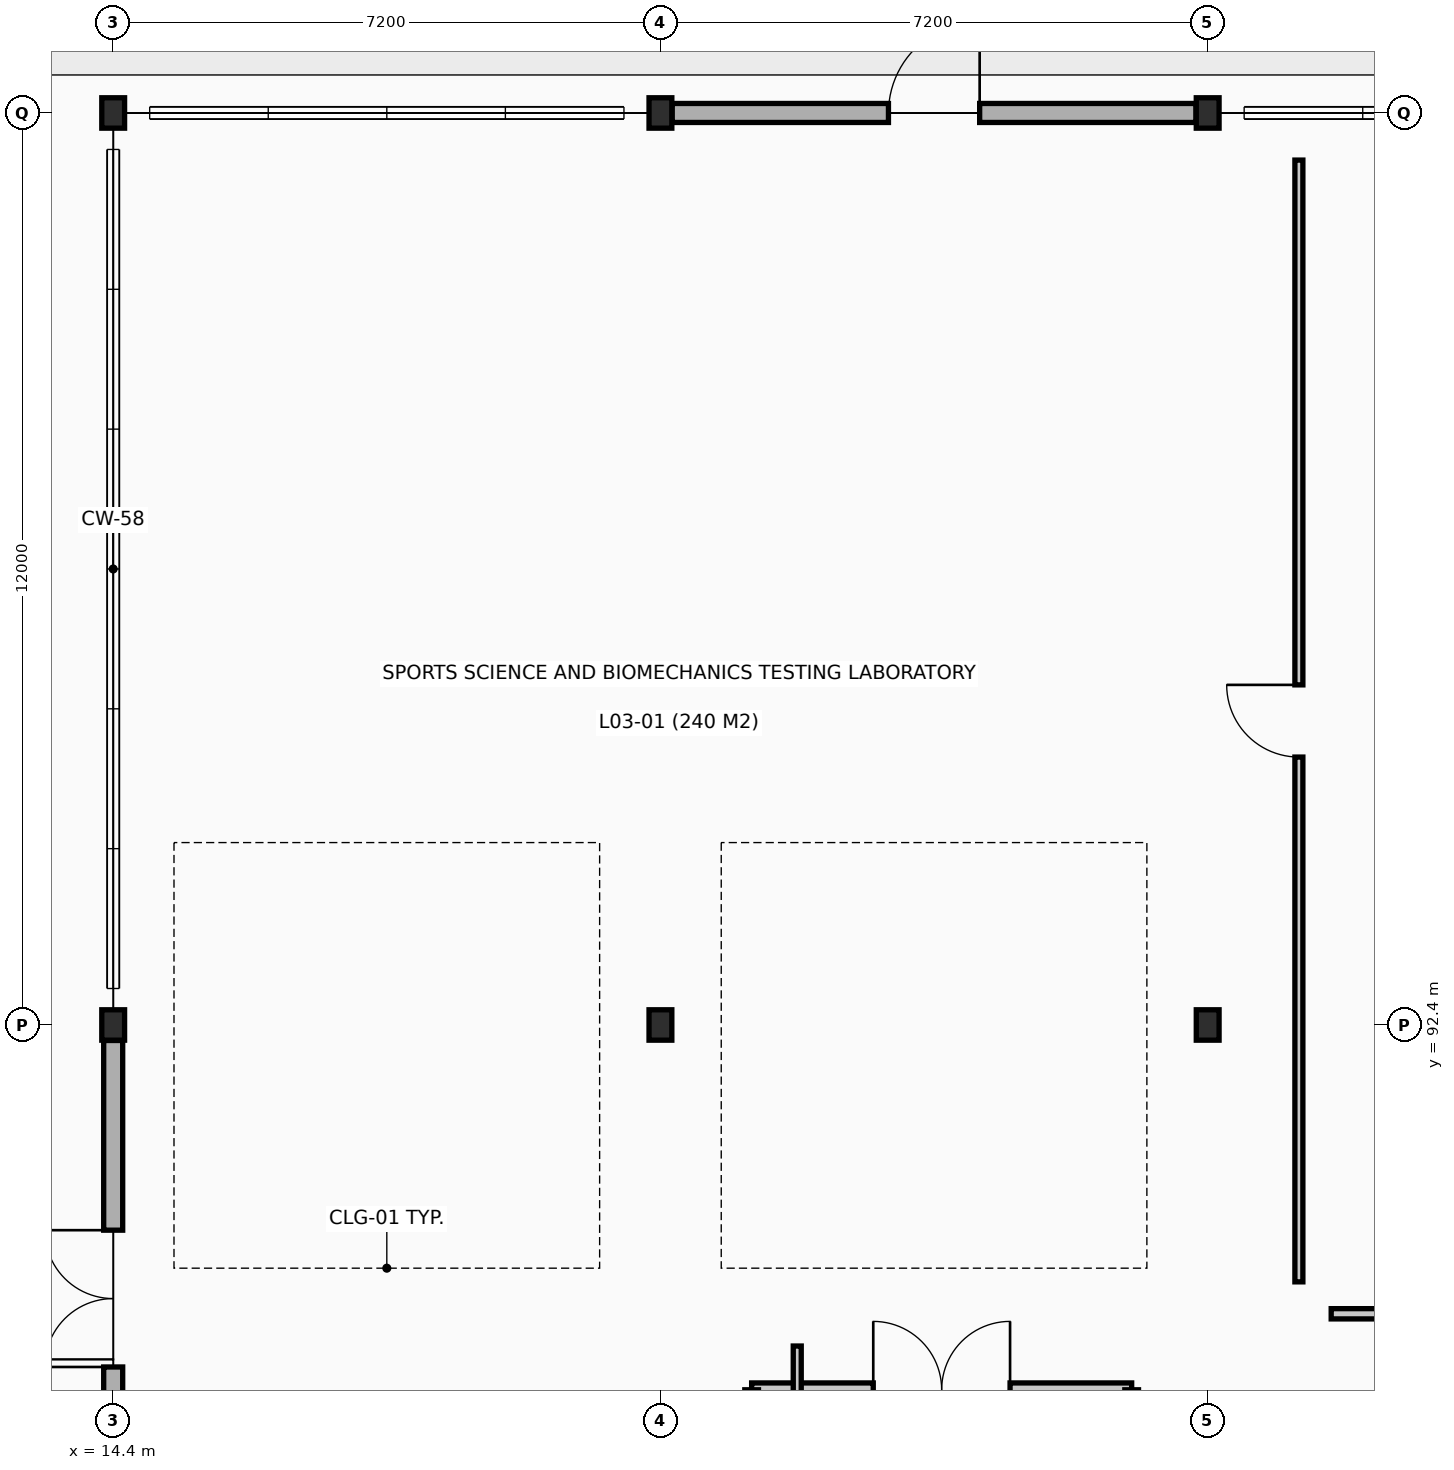
"""IFC4 building model, lengths in metres.
Left out: names, types, materials, properties, quantities, classifications, styles, units other than length and angle.
Written with IfcOpenShell. Run it as: python <this file> out.ifc"""

import sys

from ifc_helpers import new_model, si_unit, direction, frame, frame_2d, origin, origin_2d, place, context, subcontext, project, spatial, rectangle, i_section, extrude, element, fill, save


model = new_model("IFC4")
c1 = context("Model", 3, precision=1e-05, world=origin(), true_north=direction((0.0, 1.0)))
c2 = subcontext(c1, "Body", "Model", "MODEL_VIEW")
j1 = project(units=[si_unit("LENGTHUNIT", "METRE"), si_unit("PLANEANGLEUNIT", "RADIAN")], contexts=[c1])
p1 = place(None, origin())
s1 = spatial("IfcSite", under=j1, at=p1, CompositionType="ELEMENT")
p2 = place(p1, origin())
s2 = spatial("IfcBuilding", under=s1, at=p2, CompositionType="ELEMENT")
p3 = place(p2, frame((0.0, 0.0, 14.4)))
s3 = spatial("IfcBuildingStorey", under=s2, at=p3, CompositionType="ELEMENT", Elevation=14.4)
for number, where, z_axis, x_axis in (
    (1, (14.4, 92.4, 0.0), (0.0, 0.0, 1.0), (1.0, 0.0, 0.0)),
    (2, (14.4, 104.4, 0.0), (0.0, 0.0, 1.0), (1.0, 0.0, 0.0)),
    (3, (21.6, 92.4, 0.0), (0.0, 0.0, 1.0), (1.0, 0.0, 0.0)),
    (4, (21.6, 104.4, 0.0), (0.0, 0.0, 1.0), (1.0, 0.0, 0.0)),
    (5, (28.8, 92.4, 0.0), (0.0, 0.0, 1.0), (1.0, 0.0, 0.0)),
    (6, (28.8, 104.4, 0.0), (0.0, 0.0, 1.0), (1.0, 0.0, 0.0)),
):
    element("IfcColumn", number, at=place(p3, frame(where, z_axis=z_axis, x_axis=x_axis)), inside=s3, PredefinedType="COLUMN", context=c2, shape_type="SweptSolid", body=[
        extrude(i_section(OverallWidth=0.3, OverallDepth=0.4, WebThickness=0.013, FlangeThickness=0.024, at=origin_2d()), origin(), (0.0, 0.0, 1.0), 4.8),
    ])
p4 = place(p3, frame((21.754, 104.4, 0.0), z_axis=(0.0, 0.0, 1.0), x_axis=(1.0, 0.0, 0.0)))
e7 = element("IfcWall", 7, at=p4, inside=s3, PredefinedType="SOLIDWALL", context=c2, shape_type="SweptSolid", body=[
    extrude(rectangle(XDim=6.892, YDim=0.25, at=frame_2d((3.446, 0.0))), origin(), (0.0, 0.0, 1.0), 3.15),
])
p5 = place(p4, frame((2.846, 0.0, 0.0)))
e8 = element("IfcOpeningElement", 8, at=p5, cuts=e7, PredefinedType="OPENING", context=c2, shape_type="SweptSolid", body=[
    extrude(rectangle(XDim=1.2, YDim=2.2, at=frame_2d((0.6, 1.1))), frame((0.0, 0.135, 0.0), z_axis=(0.0, -1.0, 0.0), x_axis=(1.0, 0.0, 0.0)), (0.0, 0.0, 1.0), 0.27),
])
p6 = place(p3, frame((14.4, 85.404, 0.0), z_axis=(0.0, 0.0, 1.0), x_axis=(0.0, 1.0, 0.0)))
e9 = element("IfcWall", 9, at=p6, inside=s3, PredefinedType="SOLIDWALL", context=c2, shape_type="SweptSolid", body=[
    extrude(rectangle(XDim=6.792, YDim=0.25, at=frame_2d((3.396, 0.0))), origin(), (0.0, 0.0, 1.0), 3.15),
])
p7 = place(p6, frame((2.496, 0.0, 0.0)))
e10 = element("IfcOpeningElement", 10, at=p7, cuts=e9, PredefinedType="OPENING", context=c2, shape_type="SweptSolid", body=[
    extrude(rectangle(XDim=1.8, YDim=2.2, at=frame_2d((0.9, 1.1))), frame((0.0, 0.135, 0.0), z_axis=(0.0, -1.0, 0.0), x_axis=(1.0, 0.0, 0.0)), (0.0, 0.0, 1.0), 0.27),
])
p8 = place(p3, frame((22.8, 87.6, 0.0), z_axis=(0.0, 0.0, 1.0), x_axis=(1.0, 0.0, 0.0)))
e11 = element("IfcWall", 11, at=p8, inside=s3, PredefinedType="PARTITIONING", context=c2, shape_type="SweptSolid", body=[
    extrude(rectangle(XDim=5.0, YDim=0.18, at=frame_2d((2.5, 0.0))), origin(), (0.0, 0.0, 1.0), 3.985),
])
p9 = place(p8, frame((1.6, 0.0, 0.0)))
e12 = element("IfcOpeningElement", 12, at=p9, cuts=e11, PredefinedType="OPENING", context=c2, shape_type="SweptSolid", body=[
    extrude(rectangle(XDim=1.8, YDim=2.15, at=frame_2d((0.9, 1.075))), frame((0.0, 0.1, 0.0), z_axis=(0.0, -1.0, 0.0), x_axis=(1.0, 0.0, 0.0)), (0.0, 0.0, 1.0), 0.2),
])
p10 = place(p3, frame((30.0, 89.02, 0.0), z_axis=(0.0, 0.0, 1.0), x_axis=(0.0, 1.0, 0.0)))
e13 = element("IfcWall", 13, at=p10, inside=s3, PredefinedType="PARTITIONING", context=c2, shape_type="SweptSolid", body=[
    extrude(rectangle(XDim=14.76, YDim=0.105, at=frame_2d((7.38, 0.0))), origin(), (0.0, 0.0, 1.0), 3.985),
])
p11 = place(p10, frame((6.905, 0.0, 0.0)))
e14 = element("IfcOpeningElement", 14, at=p11, cuts=e13, PredefinedType="OPENING", context=c2, shape_type="SweptSolid", body=[
    extrude(rectangle(XDim=0.95, YDim=2.1, at=frame_2d((0.475, 1.05))), frame((0.0, 0.062, 0.0), z_axis=(0.0, -1.0, 0.0), x_axis=(1.0, 0.0, 0.0)), (0.0, 0.0, 1.0), 0.125),
])
p12 = place(p3, frame((30.425, 88.6, 0.0), z_axis=(0.0, 0.0, 1.0), x_axis=(1.0, 0.0, 0.0)))
e15 = element("IfcWall", 15, at=p12, inside=s3, PredefinedType="PARTITIONING", context=c2, shape_type="SweptSolid", body=[
    extrude(rectangle(XDim=11.955, YDim=0.135, at=frame_2d((5.978, 0.0))), origin(), (0.0, 0.0, 1.0), 3.985),
])
p13 = place(p12, frame((5.478, 0.0, 0.0)))
e16 = element("IfcOpeningElement", 16, at=p13, cuts=e15, PredefinedType="OPENING", context=c2, shape_type="SweptSolid", body=[
    extrude(rectangle(XDim=1.0, YDim=2.1, at=frame_2d((0.5, 1.05))), frame((0.0, 0.077, 0.0), z_axis=(0.0, -1.0, 0.0), x_axis=(1.0, 0.0, 0.0)), (0.0, 0.0, 1.0), 0.155),
])
p14 = place(p12, frame((7.377, 0.0, 0.0)))
e17 = element("IfcOpeningElement", 17, at=p14, cuts=e15, PredefinedType="OPENING", context=c2, shape_type="SweptSolid", body=[
    extrude(rectangle(XDim=1.0, YDim=2.1, at=frame_2d((0.5, 1.05))), frame((0.0, 0.077, 0.0), z_axis=(0.0, -1.0, 0.0), x_axis=(1.0, 0.0, 0.0)), (0.0, 0.0, 1.0), 0.155),
])
p15 = place(p3, frame((23.4, 85.82, 0.0), z_axis=(0.0, 0.0, 1.0), x_axis=(0.0, 1.0, 0.0)))
e18 = element("IfcWall", 18, at=p15, inside=s3, PredefinedType="PARTITIONING", context=c2, shape_type="SweptSolid", body=[
    extrude(rectangle(XDim=2.356, YDim=0.105, at=frame_2d((1.178, 0.0))), origin(), (0.0, 0.0, 1.0), 3.985),
])
p16 = place(p5, origin())
e19 = element("IfcDoor", 19, at=p16, inside=s3, OperationType="SINGLE_SWING_RIGHT", PredefinedType="DOOR", context=c2, shape_type="SweptSolid", body=[
    extrude(rectangle(XDim=1.2, YDim=2.2, at=frame_2d((0.6, 1.1))), frame((0.0, 0.025, 0.0), z_axis=(0.0, -1.0, 0.0), x_axis=(1.0, 0.0, 0.0)), (0.0, 0.0, 1.0), 0.05),
])
fill(e8, e19)
p17 = place(p7, origin())
e20 = element("IfcDoor", 20, at=p17, inside=s3, OperationType="DOUBLE_DOOR_SINGLE_SWING", PredefinedType="DOOR", context=c2, shape_type="SweptSolid", body=[
    extrude(rectangle(XDim=1.8, YDim=2.2, at=frame_2d((0.9, 1.1))), frame((0.0, 0.025, 0.0), z_axis=(0.0, -1.0, 0.0), x_axis=(1.0, 0.0, 0.0)), (0.0, 0.0, 1.0), 0.05),
])
fill(e10, e20)
p18 = place(p9, origin())
e21 = element("IfcDoor", 21, at=p18, inside=s3, OperationType="DOUBLE_DOOR_SINGLE_SWING", PredefinedType="DOOR", context=c2, shape_type="SweptSolid", body=[
    extrude(rectangle(XDim=1.8, YDim=2.15, at=frame_2d((0.9, 1.075))), frame((0.0, 0.025, 0.0), z_axis=(0.0, -1.0, 0.0), x_axis=(1.0, 0.0, 0.0)), (0.0, 0.0, 1.0), 0.05),
])
fill(e12, e21)
p19 = place(p11, origin())
e22 = element("IfcDoor", 22, at=p19, inside=s3, OperationType="SINGLE_SWING_RIGHT", PredefinedType="DOOR", context=c2, shape_type="SweptSolid", body=[
    extrude(rectangle(XDim=0.95, YDim=2.1, at=frame_2d((0.475, 1.05))), frame((0.0, 0.025, 0.0), z_axis=(0.0, -1.0, 0.0), x_axis=(1.0, 0.0, 0.0)), (0.0, 0.0, 1.0), 0.05),
])
fill(e14, e22)
save(model, sys.argv[1])
